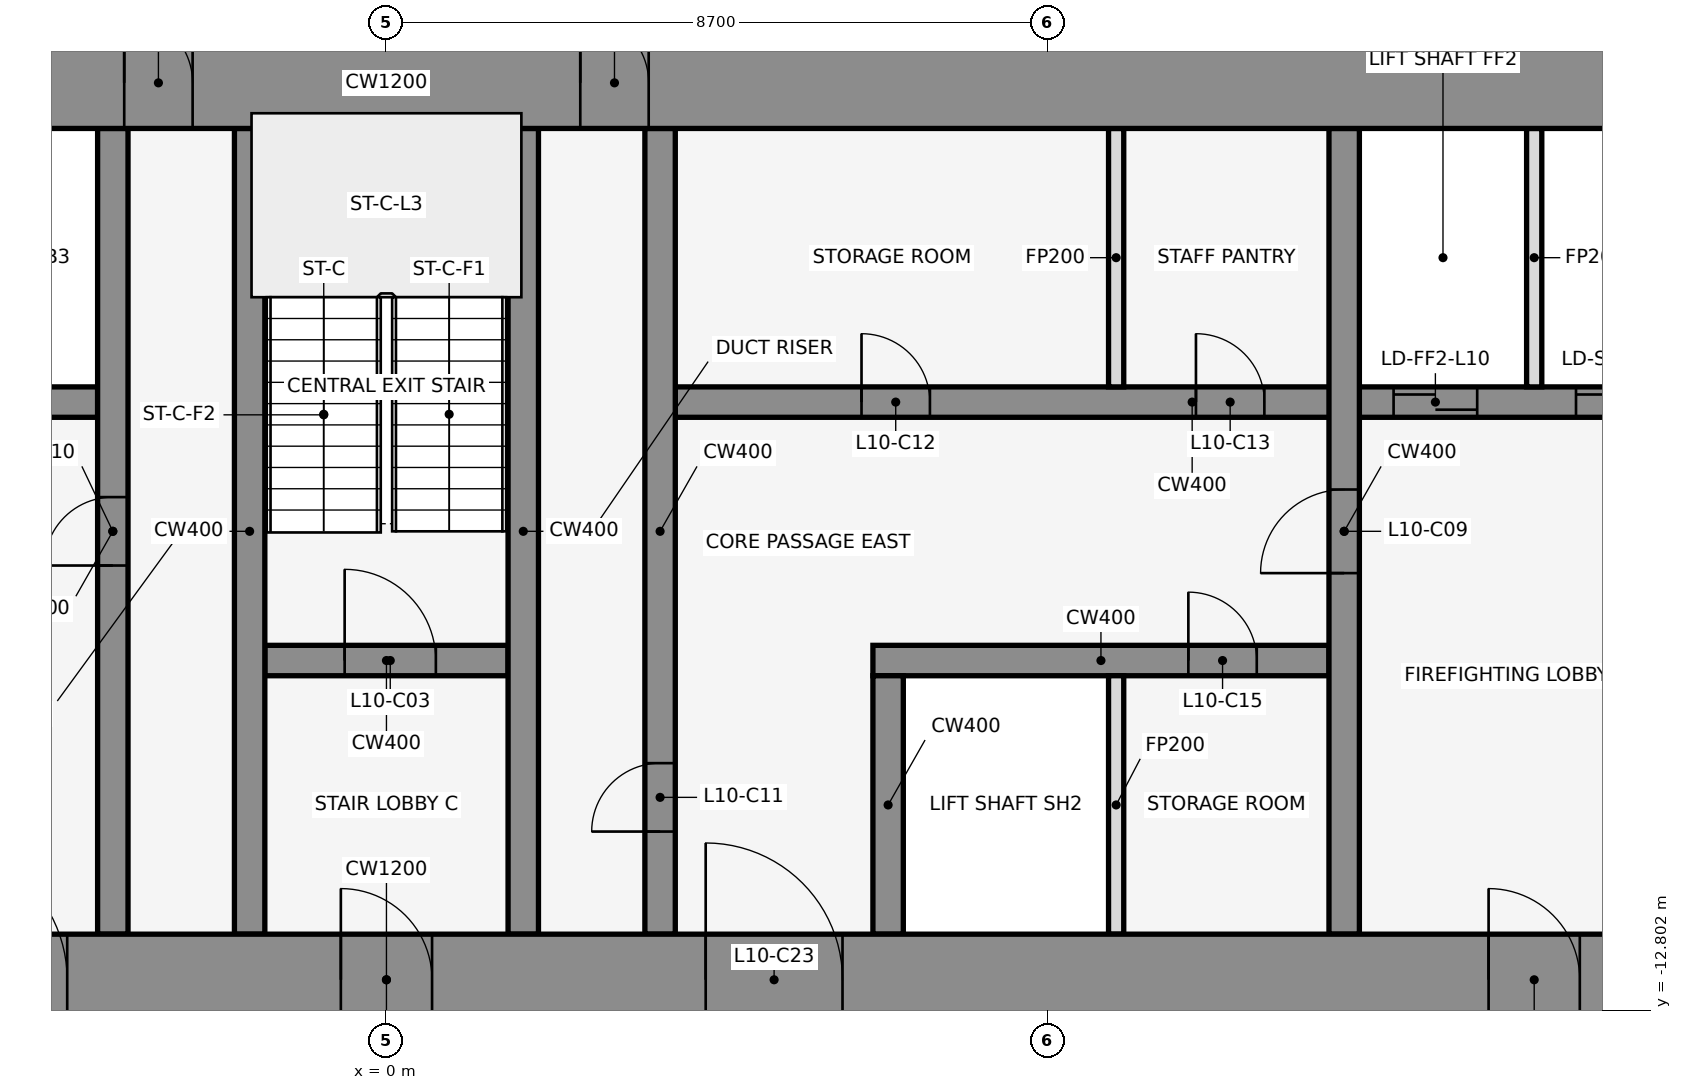
"""IFC4 building model, lengths in metres.
Left out: names, types, materials, properties, quantities, classifications, styles, units other than length and angle.
Written with IfcOpenShell. Run it as: python <this file> out.ifc"""

import sys

from ifc_helpers import new_model, si_unit, direction, frame, frame_2d, origin, place, context, subcontext, project, spatial, rectangle, extrude, element, fill, save


model = new_model("IFC4")
c1 = context("Model", 3, precision=1e-05, world=origin(), true_north=direction((0.0, 1.0)))
c2 = subcontext(c1, "Body", "Model", "MODEL_VIEW")
j1 = project(units=[si_unit("LENGTHUNIT", "METRE"), si_unit("PLANEANGLEUNIT", "RADIAN")], contexts=[c1])
p1 = place(None, origin())
s1 = spatial("IfcSite", under=j1, at=p1, CompositionType="ELEMENT")
p2 = place(p1, origin())
s2 = spatial("IfcBuilding", under=s1, at=p2, CompositionType="ELEMENT")
p3 = place(p2, frame((0.0, 0.0, 53.0)))
s3 = spatial("IfcBuildingStorey", under=s2, at=p3, CompositionType="ELEMENT", Elevation=53.0)
for number, where, z_axis, x_axis in (
    (1, (16.432, -0.105, 0.0), (0.0, 0.0, 1.0), (-0.84, 0.543, 0.0)),
    (2, (1.901, 1.08, 0.0), (0.0, 0.0, 1.0), (-0.84, -0.543, 0.0)),
    (3, (-0.068, -0.105, 0.0), (0.0, 0.0, 1.0), (-0.84, 0.543, 0.0)),
):
    element("IfcWall", number, at=place(p3, frame(where, z_axis=z_axis, x_axis=x_axis)), inside=s3, PredefinedType="STANDARD", context=c2, shape_type="SweptSolid", body=[
        extrude(rectangle(XDim=2.183, YDim=0.25, at=frame_2d((1.091, 0.0))), origin(), (0.0, 0.0, 1.0), 4.35),
    ])
p4 = place(p3, frame((-1.6, -8.2, 0.0), z_axis=(0.0, 0.0, 1.0), x_axis=(1.0, 0.0, 0.0)))
e4 = element("IfcWall", 4, at=p4, inside=s3, PredefinedType="SHEAR", context=c2, shape_type="SweptSolid", body=[
    extrude(rectangle(XDim=3.2, YDim=0.4, at=frame_2d((1.6, 0.0))), origin(), (0.0, 0.0, 1.0), 4.5),
])
p5 = place(p4, frame((1.05, 0.0, 0.0)))
e5 = element("IfcOpeningElement", 5, at=p5, cuts=e4, PredefinedType="OPENING", context=c2, shape_type="SweptSolid", body=[
    extrude(rectangle(XDim=1.2, YDim=2.1, at=frame_2d((0.6, 1.05))), frame((0.0, 0.212, 0.0), z_axis=(0.0, -1.0, 0.0), x_axis=(1.0, 0.0, 0.0)), (0.0, 0.0, 1.0), 0.424),
])
p6 = place(p3, frame((6.4, -8.2, 0.0), z_axis=(0.0, 0.0, 1.0), x_axis=(1.0, 0.0, 0.0)))
e6 = element("IfcWall", 6, at=p6, inside=s3, PredefinedType="SHEAR", context=c2, shape_type="SweptSolid", body=[
    extrude(rectangle(XDim=6.0, YDim=0.4, at=frame_2d((3.0, 0.0))), origin(), (0.0, 0.0, 1.0), 4.5),
])
p7 = place(p6, frame((4.15, 0.0, 0.0)))
e7 = element("IfcOpeningElement", 7, at=p7, cuts=e6, PredefinedType="OPENING", context=c2, shape_type="SweptSolid", body=[
    extrude(rectangle(XDim=0.9, YDim=2.1, at=frame_2d((0.45, 1.05))), frame((0.0, 0.212, 0.0), z_axis=(0.0, -1.0, 0.0), x_axis=(1.0, 0.0, 0.0)), (0.0, 0.0, 1.0), 0.424),
])
p8 = place(p3, frame((-17.4, -4.8, 0.0), z_axis=(0.0, 0.0, 1.0), x_axis=(1.0, 0.0, 0.0)))
e8 = element("IfcWall", 8, at=p8, inside=s3, PredefinedType="SHEAR", context=c2, shape_type="SweptSolid", body=[
    extrude(rectangle(XDim=13.6, YDim=0.4, at=frame_2d((6.8, 0.0))), origin(), (0.0, 0.0, 1.0), 4.5),
])
p9 = place(p8, frame((0.65, 0.0, 0.0)))
e9 = element("IfcOpeningElement", 9, at=p9, cuts=e8, PredefinedType="OPENING", context=c2, shape_type="SweptSolid", body=[
    extrude(rectangle(XDim=1.1, YDim=2.1, at=frame_2d((0.55, 1.05))), frame((0.0, 0.212, 0.0), z_axis=(0.0, -1.0, 0.0), x_axis=(1.0, 0.0, 0.0)), (0.0, 0.0, 1.0), 0.424),
])
p10 = place(p8, frame((2.95, 0.0, 0.0)))
e10 = element("IfcOpeningElement", 10, at=p10, cuts=e8, PredefinedType="OPENING", context=c2, shape_type="SweptSolid", body=[
    extrude(rectangle(XDim=1.1, YDim=2.1, at=frame_2d((0.55, 1.05))), frame((0.0, 0.212, 0.0), z_axis=(0.0, -1.0, 0.0), x_axis=(1.0, 0.0, 0.0)), (0.0, 0.0, 1.0), 0.424),
])
p11 = place(p8, frame((5.65, 0.0, 0.0)))
e11 = element("IfcOpeningElement", 11, at=p11, cuts=e8, PredefinedType="OPENING", context=c2, shape_type="SweptSolid", body=[
    extrude(rectangle(XDim=1.2, YDim=2.1, at=frame_2d((0.6, 1.05))), frame((0.0, 0.212, 0.0), z_axis=(0.0, -1.0, 0.0), x_axis=(1.0, 0.0, 0.0)), (0.0, 0.0, 1.0), 0.424),
])
p12 = place(p8, frame((8.65, 0.0, 0.0)))
e12 = element("IfcOpeningElement", 12, at=p12, cuts=e8, PredefinedType="OPENING", context=c2, shape_type="SweptSolid", body=[
    extrude(rectangle(XDim=1.2, YDim=2.1, at=frame_2d((0.6, 1.05))), frame((0.0, 0.212, 0.0), z_axis=(0.0, -1.0, 0.0), x_axis=(1.0, 0.0, 0.0)), (0.0, 0.0, 1.0), 0.424),
])
p13 = place(p8, frame((11.65, 0.0, 0.0)))
e13 = element("IfcOpeningElement", 13, at=p13, cuts=e8, PredefinedType="OPENING", context=c2, shape_type="SweptSolid", body=[
    extrude(rectangle(XDim=1.2, YDim=2.1, at=frame_2d((0.6, 1.05))), frame((0.0, 0.212, 0.0), z_axis=(0.0, -1.0, 0.0), x_axis=(1.0, 0.0, 0.0)), (0.0, 0.0, 1.0), 0.424),
])
p14 = place(p3, frame((3.8, -4.8, 0.0), z_axis=(0.0, 0.0, 1.0), x_axis=(1.0, 0.0, 0.0)))
e14 = element("IfcWall", 14, at=p14, inside=s3, PredefinedType="SHEAR", context=c2, shape_type="SweptSolid", body=[
    extrude(rectangle(XDim=13.6, YDim=0.4, at=frame_2d((6.8, 0.0))), origin(), (0.0, 0.0, 1.0), 4.5),
])
p15 = place(p14, frame((9.45, 0.0, 0.0)))
e15 = element("IfcOpeningElement", 15, at=p15, cuts=e14, PredefinedType="OPENING", context=c2, shape_type="SweptSolid", body=[
    extrude(rectangle(XDim=1.1, YDim=2.1, at=frame_2d((0.55, 1.05))), frame((0.0, 0.212, 0.0), z_axis=(0.0, -1.0, 0.0), x_axis=(1.0, 0.0, 0.0)), (0.0, 0.0, 1.0), 0.424),
])
p16 = place(p14, frame((11.85, 0.0, 0.0)))
e16 = element("IfcOpeningElement", 16, at=p16, cuts=e14, PredefinedType="OPENING", context=c2, shape_type="SweptSolid", body=[
    extrude(rectangle(XDim=1.1, YDim=2.1, at=frame_2d((0.55, 1.05))), frame((0.0, 0.212, 0.0), z_axis=(0.0, -1.0, 0.0), x_axis=(1.0, 0.0, 0.0)), (0.0, 0.0, 1.0), 0.424),
])
p17 = place(p14, frame((2.45, 0.0, 0.0)))
e17 = element("IfcOpeningElement", 17, at=p17, cuts=e14, PredefinedType="OPENING", context=c2, shape_type="SweptSolid", body=[
    extrude(rectangle(XDim=0.9, YDim=2.1, at=frame_2d((0.45, 1.05))), frame((0.0, 0.212, 0.0), z_axis=(0.0, -1.0, 0.0), x_axis=(1.0, 0.0, 0.0)), (0.0, 0.0, 1.0), 0.424),
])
p18 = place(p14, frame((6.85, 0.0, 0.0)))
e18 = element("IfcOpeningElement", 18, at=p18, cuts=e14, PredefinedType="OPENING", context=c2, shape_type="SweptSolid", body=[
    extrude(rectangle(XDim=0.9, YDim=2.1, at=frame_2d((0.45, 1.05))), frame((0.0, 0.212, 0.0), z_axis=(0.0, -1.0, 0.0), x_axis=(1.0, 0.0, 0.0)), (0.0, 0.0, 1.0), 0.424),
])
p19 = place(p3, frame((-3.6, -11.8, 0.0), z_axis=(0.0, 0.0, 1.0), x_axis=(0.0, 1.0, 0.0)))
e19 = element("IfcWall", 19, at=p19, inside=s3, PredefinedType="SHEAR", context=c2, shape_type="SweptSolid", body=[
    extrude(rectangle(XDim=10.6, YDim=0.4, at=frame_2d((5.3, 0.0))), origin(), (0.0, 0.0, 1.0), 4.5),
])
p20 = place(p19, frame((4.85, 0.0, 0.0)))
e20 = element("IfcOpeningElement", 20, at=p20, cuts=e19, PredefinedType="OPENING", context=c2, shape_type="SweptSolid", body=[
    extrude(rectangle(XDim=0.9, YDim=2.1, at=frame_2d((0.45, 1.05))), frame((0.0, 0.212, 0.0), z_axis=(0.0, -1.0, 0.0), x_axis=(1.0, 0.0, 0.0)), (0.0, 0.0, 1.0), 0.424),
])
for number, where, z_axis, x_axis in (
    (21, (-1.8, -11.8, 0.0), (0.0, 0.0, 1.0), (0.0, 1.0, 0.0)),
    (22, (1.8, -11.8, 0.0), (0.0, 0.0, 1.0), (0.0, 1.0, 0.0)),
):
    element("IfcWall", number, at=place(p3, frame(where, z_axis=z_axis, x_axis=x_axis)), inside=s3, PredefinedType="SHEAR", context=c2, shape_type="SweptSolid", body=[
        extrude(rectangle(XDim=10.6, YDim=0.4, at=frame_2d((5.3, 0.0))), origin(), (0.0, 0.0, 1.0), 4.5),
    ])
p21 = place(p3, frame((3.6, -11.8, 0.0), z_axis=(0.0, 0.0, 1.0), x_axis=(0.0, 1.0, 0.0)))
e23 = element("IfcWall", 23, at=p21, inside=s3, PredefinedType="SHEAR", context=c2, shape_type="SweptSolid", body=[
    extrude(rectangle(XDim=10.6, YDim=0.4, at=frame_2d((5.3, 0.0))), origin(), (0.0, 0.0, 1.0), 4.5),
])
p22 = place(p21, frame((1.35, 0.0, 0.0)))
e24 = element("IfcOpeningElement", 24, at=p22, cuts=e23, PredefinedType="OPENING", context=c2, shape_type="SweptSolid", body=[
    extrude(rectangle(XDim=0.9, YDim=2.1, at=frame_2d((0.45, 1.05))), frame((0.0, 0.212, 0.0), z_axis=(0.0, -1.0, 0.0), x_axis=(1.0, 0.0, 0.0)), (0.0, 0.0, 1.0), 0.424),
])
p23 = place(p3, frame((6.6, -11.8, 0.0), z_axis=(0.0, 0.0, 1.0), x_axis=(0.0, 1.0, 0.0)))
e25 = element("IfcWall", 25, at=p23, inside=s3, PredefinedType="SHEAR", context=c2, shape_type="SweptSolid", body=[
    extrude(rectangle(XDim=3.4, YDim=0.4, at=frame_2d((1.7, 0.0))), origin(), (0.0, 0.0, 1.0), 4.5),
])
for number, where, z_axis, x_axis in (
    (26, (9.6, -11.8, 0.0), (0.0, 0.0, 1.0), (0.0, 1.0, 0.0)),
    (27, (9.6, -4.6, 0.0), (0.0, 0.0, 1.0), (0.0, 1.0, 0.0)),
):
    element("IfcWall", number, at=place(p3, frame(where, z_axis=z_axis, x_axis=x_axis)), inside=s3, PredefinedType="PARTITIONING", context=c2, shape_type="SweptSolid", body=[
        extrude(rectangle(XDim=3.4, YDim=0.2, at=frame_2d((1.7, 0.0))), origin(), (0.0, 0.0, 1.0), 3.418),
    ])
p24 = place(p3, frame((12.6, -11.8, 0.0), z_axis=(0.0, 0.0, 1.0), x_axis=(0.0, 1.0, 0.0)))
e28 = element("IfcWall", 28, at=p24, inside=s3, PredefinedType="SHEAR", context=c2, shape_type="SweptSolid", body=[
    extrude(rectangle(XDim=10.6, YDim=0.4, at=frame_2d((5.3, 0.0))), origin(), (0.0, 0.0, 1.0), 4.5),
])
p25 = place(p24, frame((4.75, 0.0, 0.0)))
e29 = element("IfcOpeningElement", 29, at=p25, cuts=e28, PredefinedType="OPENING", context=c2, shape_type="SweptSolid", body=[
    extrude(rectangle(XDim=1.1, YDim=2.1, at=frame_2d((0.55, 1.05))), frame((0.0, 0.212, 0.0), z_axis=(0.0, -1.0, 0.0), x_axis=(1.0, 0.0, 0.0)), (0.0, 0.0, 1.0), 0.424),
])
p26 = place(p3, frame((15.1, -4.6, 0.0), z_axis=(0.0, 0.0, 1.0), x_axis=(0.0, 1.0, 0.0)))
e30 = element("IfcWall", 30, at=p26, inside=s3, PredefinedType="PARTITIONING", context=c2, shape_type="SweptSolid", body=[
    extrude(rectangle(XDim=3.4, YDim=0.2, at=frame_2d((1.7, 0.0))), origin(), (0.0, 0.0, 1.0), 3.418),
])
p27 = place(p3, frame((-22.0, -0.6, 0.0), z_axis=(0.0, 0.0, 1.0), x_axis=(1.0, 0.0, 0.0)))
e31 = element("IfcWall", 31, at=p27, inside=s3, PredefinedType="SHEAR", context=c2, shape_type="SweptSolid", body=[
    extrude(rectangle(XDim=44.0, YDim=1.2, at=frame_2d((22.0, 0.0))), origin(), (0.0, 0.0, 1.0), 4.5),
])
p28 = place(p27, frame((18.55, 0.0, 0.0)))
e32 = element("IfcOpeningElement", 32, at=p28, cuts=e31, PredefinedType="OPENING", context=c2, shape_type="SweptSolid", body=[
    extrude(rectangle(XDim=0.9, YDim=2.1, at=frame_2d((0.45, 1.05))), frame((0.0, 0.612, 0.0), z_axis=(0.0, -1.0, 0.0), x_axis=(1.0, 0.0, 0.0)), (0.0, 0.0, 1.0), 1.224),
])
p29 = place(p27, frame((24.55, 0.0, 0.0)))
e33 = element("IfcOpeningElement", 33, at=p29, cuts=e31, PredefinedType="OPENING", context=c2, shape_type="SweptSolid", body=[
    extrude(rectangle(XDim=0.9, YDim=2.1, at=frame_2d((0.45, 1.05))), frame((0.0, 0.612, 0.0), z_axis=(0.0, -1.0, 0.0), x_axis=(1.0, 0.0, 0.0)), (0.0, 0.0, 1.0), 1.224),
])
p30 = place(p3, frame((-22.0, -12.4, 0.0), z_axis=(0.0, 0.0, 1.0), x_axis=(1.0, 0.0, 0.0)))
e34 = element("IfcWall", 34, at=p30, inside=s3, PredefinedType="SHEAR", context=c2, shape_type="SweptSolid", body=[
    extrude(rectangle(XDim=44.0, YDim=1.2, at=frame_2d((22.0, 0.0))), origin(), (0.0, 0.0, 1.0), 4.5),
])
p31 = place(p30, frame((2.2, 0.0, 0.0)))
e35 = element("IfcOpeningElement", 35, at=p31, cuts=e34, PredefinedType="OPENING", context=c2, shape_type="SweptSolid", body=[
    extrude(rectangle(XDim=1.2, YDim=2.1, at=frame_2d((0.6, 1.05))), frame((0.0, 0.612, 0.0), z_axis=(0.0, -1.0, 0.0), x_axis=(1.0, 0.0, 0.0)), (0.0, 0.0, 1.0), 1.224),
])
p32 = place(p30, frame((21.4, 0.0, 0.0)))
e36 = element("IfcOpeningElement", 36, at=p32, cuts=e34, PredefinedType="OPENING", context=c2, shape_type="SweptSolid", body=[
    extrude(rectangle(XDim=1.2, YDim=2.1, at=frame_2d((0.6, 1.05))), frame((0.0, 0.612, 0.0), z_axis=(0.0, -1.0, 0.0), x_axis=(1.0, 0.0, 0.0)), (0.0, 0.0, 1.0), 1.224),
])
p33 = place(p30, frame((40.6, 0.0, 0.0)))
e37 = element("IfcOpeningElement", 37, at=p33, cuts=e34, PredefinedType="OPENING", context=c2, shape_type="SweptSolid", body=[
    extrude(rectangle(XDim=1.2, YDim=2.1, at=frame_2d((0.6, 1.05))), frame((0.0, 0.612, 0.0), z_axis=(0.0, -1.0, 0.0), x_axis=(1.0, 0.0, 0.0)), (0.0, 0.0, 1.0), 1.224),
])
p34 = place(p30, frame((16.0, 0.0, 0.0)))
e38 = element("IfcOpeningElement", 38, at=p34, cuts=e34, PredefinedType="OPENING", context=c2, shape_type="SweptSolid", body=[
    extrude(rectangle(XDim=1.8, YDim=2.1, at=frame_2d((0.9, 1.05))), frame((0.0, 0.612, 0.0), z_axis=(0.0, -1.0, 0.0), x_axis=(1.0, 0.0, 0.0)), (0.0, 0.0, 1.0), 1.224),
])
p35 = place(p30, frame((6.3, 0.0, 0.0)))
e39 = element("IfcOpeningElement", 39, at=p35, cuts=e34, PredefinedType="OPENING", context=c2, shape_type="SweptSolid", body=[
    extrude(rectangle(XDim=1.2, YDim=2.1, at=frame_2d((0.6, 1.05))), frame((0.0, 0.612, 0.0), z_axis=(0.0, -1.0, 0.0), x_axis=(1.0, 0.0, 0.0)), (0.0, 0.0, 1.0), 1.224),
])
p36 = place(p30, frame((26.2, 0.0, 0.0)))
e40 = element("IfcOpeningElement", 40, at=p36, cuts=e34, PredefinedType="OPENING", context=c2, shape_type="SweptSolid", body=[
    extrude(rectangle(XDim=1.8, YDim=2.1, at=frame_2d((0.9, 1.05))), frame((0.0, 0.612, 0.0), z_axis=(0.0, -1.0, 0.0), x_axis=(1.0, 0.0, 0.0)), (0.0, 0.0, 1.0), 1.224),
])
p37 = place(p30, frame((36.5, 0.0, 0.0)))
e41 = element("IfcOpeningElement", 41, at=p37, cuts=e34, PredefinedType="OPENING", context=c2, shape_type="SweptSolid", body=[
    extrude(rectangle(XDim=1.2, YDim=2.1, at=frame_2d((0.6, 1.05))), frame((0.0, 0.612, 0.0), z_axis=(0.0, -1.0, 0.0), x_axis=(1.0, 0.0, 0.0)), (0.0, 0.0, 1.0), 1.224),
])
p38 = place(p5, origin())
e42 = element("IfcDoor", 42, at=p38, inside=s3, OperationType="SINGLE_SWING_LEFT", PredefinedType="DOOR", context=c2, shape_type="SweptSolid", body=[
    extrude(rectangle(XDim=1.2, YDim=2.1, at=frame_2d((0.6, 1.05))), frame((0.0, 0.025, 0.0), z_axis=(0.0, -1.0, 0.0), x_axis=(1.0, 0.0, 0.0)), (0.0, 0.0, 1.0), 0.05),
])
fill(e5, e42)
p39 = place(p15, origin())
e43 = element("IfcDoor", 43, at=p39, inside=s3, OperationType="DOUBLE_DOOR_SLIDING", PredefinedType="DOOR", context=c2, shape_type="SweptSolid", body=[
    extrude(rectangle(XDim=1.1, YDim=2.1, at=frame_2d((0.55, 1.05))), frame((0.0, 0.025, 0.0), z_axis=(0.0, -1.0, 0.0), x_axis=(1.0, 0.0, 0.0)), (0.0, 0.0, 1.0), 0.05),
])
fill(e15, e43)
p40 = place(p16, origin())
e44 = element("IfcDoor", 44, at=p40, inside=s3, OperationType="DOUBLE_DOOR_SLIDING", PredefinedType="DOOR", context=c2, shape_type="SweptSolid", body=[
    extrude(rectangle(XDim=1.1, YDim=2.1, at=frame_2d((0.55, 1.05))), frame((0.0, 0.025, 0.0), z_axis=(0.0, -1.0, 0.0), x_axis=(1.0, 0.0, 0.0)), (0.0, 0.0, 1.0), 0.05),
])
fill(e16, e44)
p41 = place(p25, frame((1.1, 0.0, 0.0), z_axis=(0.0, 0.0, 1.0), x_axis=(-1.0, 0.0, 0.0)))
e45 = element("IfcDoor", 45, at=p41, inside=s3, OperationType="SINGLE_SWING_RIGHT", PredefinedType="DOOR", context=c2, shape_type="SweptSolid", body=[
    extrude(rectangle(XDim=1.1, YDim=2.1, at=frame_2d((0.55, 1.05))), frame((0.0, 0.025, 0.0), z_axis=(0.0, -1.0, 0.0), x_axis=(1.0, 0.0, 0.0)), (0.0, 0.0, 1.0), 0.05),
])
fill(e29, e45)
p42 = place(p20, frame((0.9, 0.0, 0.0), z_axis=(0.0, 0.0, 1.0), x_axis=(-1.0, 0.0, 0.0)))
e46 = element("IfcDoor", 46, at=p42, inside=s3, OperationType="SINGLE_SWING_LEFT", PredefinedType="DOOR", context=c2, shape_type="SweptSolid", body=[
    extrude(rectangle(XDim=0.9, YDim=2.1, at=frame_2d((0.45, 1.05))), frame((0.0, 0.025, 0.0), z_axis=(0.0, -1.0, 0.0), x_axis=(1.0, 0.0, 0.0)), (0.0, 0.0, 1.0), 0.05),
])
fill(e20, e46)
p43 = place(p22, origin())
e47 = element("IfcDoor", 47, at=p43, inside=s3, OperationType="SINGLE_SWING_LEFT", PredefinedType="DOOR", context=c2, shape_type="SweptSolid", body=[
    extrude(rectangle(XDim=0.9, YDim=2.1, at=frame_2d((0.45, 1.05))), frame((0.0, 0.025, 0.0), z_axis=(0.0, -1.0, 0.0), x_axis=(1.0, 0.0, 0.0)), (0.0, 0.0, 1.0), 0.05),
])
fill(e24, e47)
p44 = place(p17, origin())
e48 = element("IfcDoor", 48, at=p44, inside=s3, OperationType="SINGLE_SWING_RIGHT", PredefinedType="DOOR", context=c2, shape_type="SweptSolid", body=[
    extrude(rectangle(XDim=0.9, YDim=2.1, at=frame_2d((0.45, 1.05))), frame((0.0, 0.025, 0.0), z_axis=(0.0, -1.0, 0.0), x_axis=(1.0, 0.0, 0.0)), (0.0, 0.0, 1.0), 0.05),
])
fill(e17, e48)
p45 = place(p18, origin())
e49 = element("IfcDoor", 49, at=p45, inside=s3, OperationType="SINGLE_SWING_LEFT", PredefinedType="DOOR", context=c2, shape_type="SweptSolid", body=[
    extrude(rectangle(XDim=0.9, YDim=2.1, at=frame_2d((0.45, 1.05))), frame((0.0, 0.025, 0.0), z_axis=(0.0, -1.0, 0.0), x_axis=(1.0, 0.0, 0.0)), (0.0, 0.0, 1.0), 0.05),
])
fill(e18, e49)
p46 = place(p7, frame((0.9, 0.0, 0.0), z_axis=(0.0, 0.0, 1.0), x_axis=(-1.0, 0.0, 0.0)))
e50 = element("IfcDoor", 50, at=p46, inside=s3, OperationType="SINGLE_SWING_RIGHT", PredefinedType="DOOR", context=c2, shape_type="SweptSolid", body=[
    extrude(rectangle(XDim=0.9, YDim=2.1, at=frame_2d((0.45, 1.05))), frame((0.0, 0.025, 0.0), z_axis=(0.0, -1.0, 0.0), x_axis=(1.0, 0.0, 0.0)), (0.0, 0.0, 1.0), 0.05),
])
fill(e7, e50)
p47 = place(p28, origin())
e51 = element("IfcDoor", 51, at=p47, inside=s3, OperationType="SINGLE_SWING_LEFT", PredefinedType="DOOR", context=c2, shape_type="SweptSolid", body=[
    extrude(rectangle(XDim=0.9, YDim=2.1, at=frame_2d((0.45, 1.05))), frame((0.0, 0.025, 0.0), z_axis=(0.0, -1.0, 0.0), x_axis=(1.0, 0.0, 0.0)), (0.0, 0.0, 1.0), 0.05),
])
fill(e32, e51)
p48 = place(p29, origin())
e52 = element("IfcDoor", 52, at=p48, inside=s3, OperationType="SINGLE_SWING_LEFT", PredefinedType="DOOR", context=c2, shape_type="SweptSolid", body=[
    extrude(rectangle(XDim=0.9, YDim=2.1, at=frame_2d((0.45, 1.05))), frame((0.0, 0.025, 0.0), z_axis=(0.0, -1.0, 0.0), x_axis=(1.0, 0.0, 0.0)), (0.0, 0.0, 1.0), 0.05),
])
fill(e33, e52)
p49 = place(p32, frame((1.2, 0.0, 0.0), z_axis=(0.0, 0.0, 1.0), x_axis=(-1.0, 0.0, 0.0)))
e53 = element("IfcDoor", 53, at=p49, inside=s3, OperationType="SINGLE_SWING_RIGHT", PredefinedType="DOOR", context=c2, shape_type="SweptSolid", body=[
    extrude(rectangle(XDim=1.2, YDim=2.1, at=frame_2d((0.6, 1.05))), frame((0.0, 0.025, 0.0), z_axis=(0.0, -1.0, 0.0), x_axis=(1.0, 0.0, 0.0)), (0.0, 0.0, 1.0), 0.05),
])
fill(e36, e53)
p50 = place(p34, origin())
e54 = element("IfcDoor", 54, at=p50, inside=s3, OperationType="SINGLE_SWING_LEFT", PredefinedType="DOOR", context=c2, shape_type="SweptSolid", body=[
    extrude(rectangle(XDim=1.8, YDim=2.1, at=frame_2d((0.9, 1.05))), frame((0.0, 0.025, 0.0), z_axis=(0.0, -1.0, 0.0), x_axis=(1.0, 0.0, 0.0)), (0.0, 0.0, 1.0), 0.05),
])
fill(e38, e54)
p51 = place(p36, origin())
e55 = element("IfcDoor", 55, at=p51, inside=s3, OperationType="SINGLE_SWING_LEFT", PredefinedType="DOOR", context=c2, shape_type="SweptSolid", body=[
    extrude(rectangle(XDim=1.8, YDim=2.1, at=frame_2d((0.9, 1.05))), frame((0.0, 0.025, 0.0), z_axis=(0.0, -1.0, 0.0), x_axis=(1.0, 0.0, 0.0)), (0.0, 0.0, 1.0), 0.05),
])
fill(e40, e55)
p52 = place(p37, frame((1.2, 0.0, 0.0), z_axis=(0.0, 0.0, 1.0), x_axis=(-1.0, 0.0, 0.0)))
e56 = element("IfcDoor", 56, at=p52, inside=s3, OperationType="SINGLE_SWING_RIGHT", PredefinedType="DOOR", context=c2, shape_type="SweptSolid", body=[
    extrude(rectangle(XDim=1.2, YDim=2.1, at=frame_2d((0.6, 1.05))), frame((0.0, 0.025, 0.0), z_axis=(0.0, -1.0, 0.0), x_axis=(1.0, 0.0, 0.0)), (0.0, 0.0, 1.0), 0.05),
])
fill(e41, e56)
save(model, sys.argv[1])
